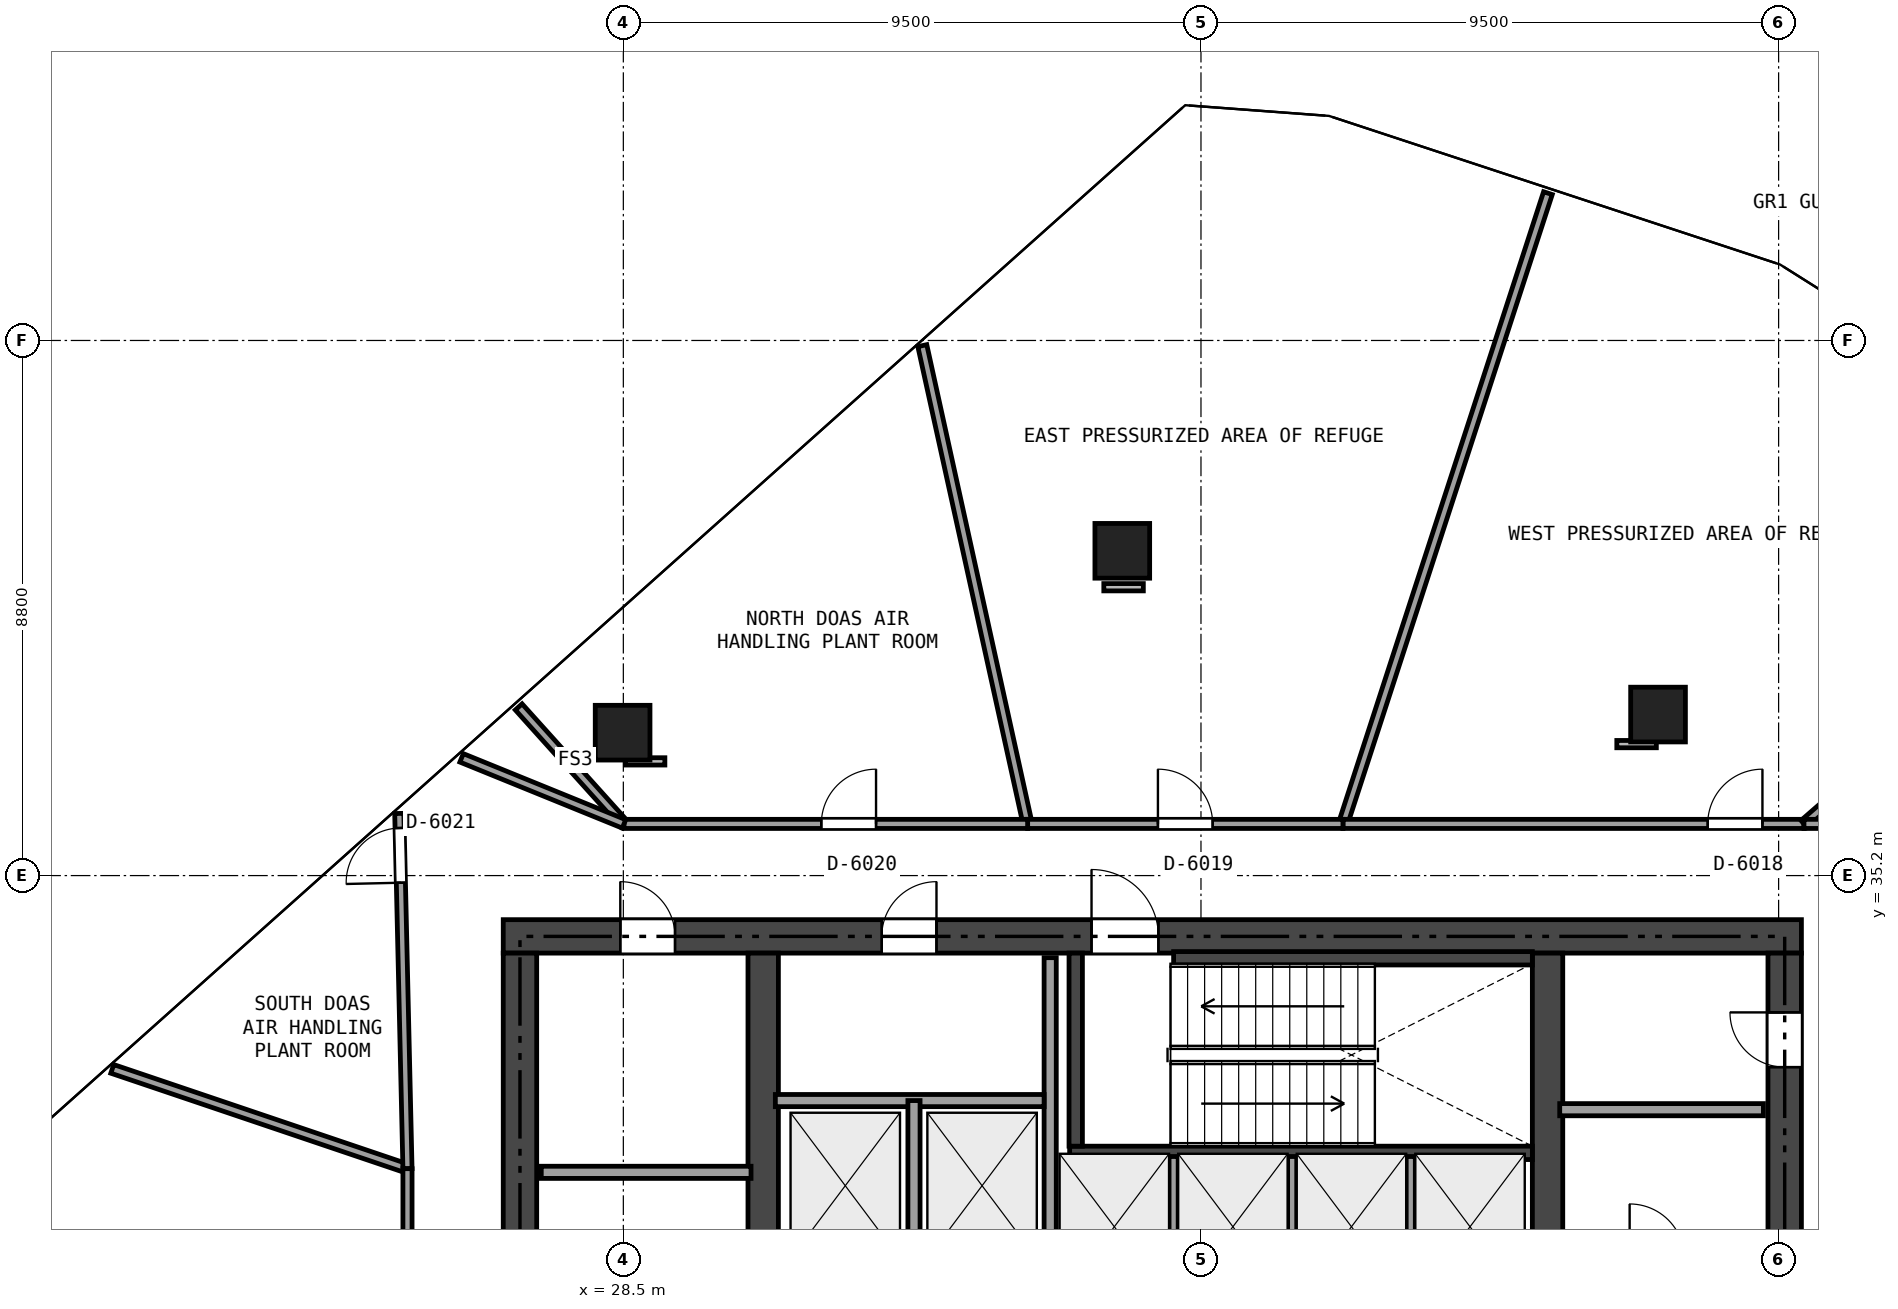
"""IFC4 building model, lengths in metres.
Left out: names, types, materials, properties, quantities, classifications, styles, units other than length and angle.
Written with IfcOpenShell. Run it as: python <this file> out.ifc"""

import sys

from ifc_helpers import new_model, si_unit, direction, frame, frame_2d, origin, origin_2d, place, context, subcontext, project, spatial, rectangle, extrude, element, fill, save


model = new_model("IFC4")
c1 = context("Model", 3, precision=1e-05, world=origin(), true_north=direction((0.0, 1.0)))
c2 = subcontext(c1, "Body", "Model", "MODEL_VIEW")
j1 = project(units=[si_unit("LENGTHUNIT", "METRE"), si_unit("PLANEANGLEUNIT", "RADIAN")], contexts=[c1])
p1 = place(None, origin())
s1 = spatial("IfcSite", under=j1, at=p1, CompositionType="ELEMENT")
p2 = place(p1, origin())
s2 = spatial("IfcBuilding", under=s1, at=p2, CompositionType="ELEMENT")
p3 = place(p2, frame((0.0, 0.0, 223.8)))
s3 = spatial("IfcBuildingStorey", under=s2, at=p3, CompositionType="ELEMENT", Elevation=223.8)
p4 = place(p3, frame((26.525, 34.2, 0.0), z_axis=(0.0, 0.0, 1.0), x_axis=(1.0, 0.0, 0.0)))
e1 = element("IfcWall", 1, at=p4, inside=s3, PredefinedType="SHEAR", context=c2, shape_type="SweptSolid", body=[
    extrude(rectangle(XDim=21.35, YDim=0.55, at=frame_2d((10.675, 0.0))), origin(), (0.0, 0.0, 1.0), 4.14),
])
p5 = place(p4, frame((9.675, 0.0, 0.0)))
e2 = element("IfcOpeningElement", 2, at=p5, cuts=e1, PredefinedType="OPENING", context=c2, shape_type="SweptSolid", body=[
    extrude(rectangle(XDim=1.1, YDim=2.15, at=frame_2d((0.55, 1.075))), frame((0.0, 0.285, 0.0), z_axis=(0.0, -1.0, 0.0), x_axis=(1.0, 0.0, 0.0)), (0.0, 0.0, 1.0), 0.57),
])
p6 = place(p4, frame((1.925, 0.0, 0.0)))
e3 = element("IfcOpeningElement", 3, at=p6, cuts=e1, PredefinedType="OPENING", context=c2, shape_type="SweptSolid", body=[
    extrude(rectangle(XDim=0.9, YDim=2.1, at=frame_2d((0.45, 1.05))), frame((0.0, 0.285, 0.0), z_axis=(0.0, -1.0, 0.0), x_axis=(1.0, 0.0, 0.0)), (0.0, 0.0, 1.0), 0.57),
])
p7 = place(p4, frame((6.225, 0.0, 0.0)))
e4 = element("IfcOpeningElement", 4, at=p7, cuts=e1, PredefinedType="OPENING", context=c2, shape_type="SweptSolid", body=[
    extrude(rectangle(XDim=0.9, YDim=2.1, at=frame_2d((0.45, 1.05))), frame((0.0, 0.285, 0.0), z_axis=(0.0, -1.0, 0.0), x_axis=(1.0, 0.0, 0.0)), (0.0, 0.0, 1.0), 0.57),
])
p8 = place(p3, frame((26.8, 18.875, 0.0), z_axis=(0.0, 0.0, 1.0), x_axis=(0.0, 1.0, 0.0)))
e5 = element("IfcWall", 5, at=p8, inside=s3, PredefinedType="SHEAR", context=c2, shape_type="SweptSolid", body=[
    extrude(rectangle(XDim=15.05, YDim=0.55, at=frame_2d((7.525, 0.0))), origin(), (0.0, 0.0, 1.0), 4.14),
])
p9 = place(p8, frame((4.6, 0.0, 0.02)))
e6 = element("IfcOpeningElement", 6, at=p9, cuts=e5, PredefinedType="OPENING", context=c2, shape_type="SweptSolid", body=[
    extrude(rectangle(XDim=0.9, YDim=2.02, at=frame_2d((0.45, 1.01))), frame((0.0, 0.285, 0.0), z_axis=(0.0, -1.0, 0.0), x_axis=(1.0, 0.0, 0.0)), (0.0, 0.0, 1.0), 0.57),
])
p10 = place(p3, frame((47.6, 18.875, 0.0), z_axis=(0.0, 0.0, 1.0), x_axis=(0.0, 1.0, 0.0)))
e7 = element("IfcWall", 7, at=p10, inside=s3, PredefinedType="SHEAR", context=c2, shape_type="SweptSolid", body=[
    extrude(rectangle(XDim=15.05, YDim=0.55, at=frame_2d((7.525, 0.0))), origin(), (0.0, 0.0, 1.0), 4.14),
])
p11 = place(p10, frame((6.625, 0.0, 0.0)))
e8 = element("IfcOpeningElement", 8, at=p11, cuts=e7, PredefinedType="OPENING", context=c2, shape_type="SweptSolid", body=[
    extrude(rectangle(XDim=1.1, YDim=2.15, at=frame_2d((0.55, 1.075))), frame((0.0, 0.285, 0.0), z_axis=(0.0, -1.0, 0.0), x_axis=(1.0, 0.0, 0.0)), (0.0, 0.0, 1.0), 0.57),
])
p12 = place(p10, frame((8.525, 0.0, 0.0)))
e9 = element("IfcOpeningElement", 9, at=p12, cuts=e7, PredefinedType="OPENING", context=c2, shape_type="SweptSolid", body=[
    extrude(rectangle(XDim=0.9, YDim=2.1, at=frame_2d((0.45, 1.05))), frame((0.0, 0.285, 0.0), z_axis=(0.0, -1.0, 0.0), x_axis=(1.0, 0.0, 0.0)), (0.0, 0.0, 1.0), 0.57),
])
p13 = place(p10, frame((13.175, 0.0, 0.0)))
e10 = element("IfcOpeningElement", 10, at=p13, cuts=e7, PredefinedType="OPENING", context=c2, shape_type="SweptSolid", body=[
    extrude(rectangle(XDim=0.9, YDim=2.1, at=frame_2d((0.45, 1.05))), frame((0.0, 0.285, 0.0), z_axis=(0.0, -1.0, 0.0), x_axis=(1.0, 0.0, 0.0)), (0.0, 0.0, 1.0), 0.57),
])
p14 = place(p3, frame((30.8, 18.875, 0.0), z_axis=(0.0, 0.0, 1.0), x_axis=(0.0, 1.0, 0.0)))
e11 = element("IfcWall", 11, at=p14, inside=s3, PredefinedType="SHEAR", context=c2, shape_type="SweptSolid", body=[
    extrude(rectangle(XDim=15.05, YDim=0.5, at=frame_2d((7.525, 0.0))), origin(), (0.0, 0.0, 1.0), 4.14),
])
p15 = place(p14, frame((6.625, 0.0, 0.0)))
e12 = element("IfcOpeningElement", 12, at=p15, cuts=e11, PredefinedType="OPENING", context=c2, shape_type="SweptSolid", body=[
    extrude(rectangle(XDim=1.1, YDim=2.15, at=frame_2d((0.55, 1.075))), frame((0.0, 0.26, 0.0), z_axis=(0.0, -1.0, 0.0), x_axis=(1.0, 0.0, 0.0)), (0.0, 0.0, 1.0), 0.52),
])
p16 = place(p14, frame((8.425, 0.0, 0.0)))
e13 = element("IfcOpeningElement", 13, at=p16, cuts=e11, PredefinedType="OPENING", context=c2, shape_type="SweptSolid", body=[
    extrude(rectangle(XDim=0.9, YDim=2.1, at=frame_2d((0.45, 1.05))), frame((0.0, 0.26, 0.0), z_axis=(0.0, -1.0, 0.0), x_axis=(1.0, 0.0, 0.0)), (0.0, 0.0, 1.0), 0.52),
])
p17 = place(p3, frame((43.7, 18.875, 0.0), z_axis=(0.0, 0.0, 1.0), x_axis=(0.0, 1.0, 0.0)))
e14 = element("IfcWall", 14, at=p17, inside=s3, PredefinedType="SHEAR", context=c2, shape_type="SweptSolid", body=[
    extrude(rectangle(XDim=15.05, YDim=0.5, at=frame_2d((7.525, 0.0))), origin(), (0.0, 0.0, 1.0), 4.14),
])
p18 = place(p17, frame((8.125, 0.0, 0.0)))
e15 = element("IfcOpeningElement", 15, at=p18, cuts=e14, PredefinedType="OPENING", context=c2, shape_type="SweptSolid", body=[
    extrude(rectangle(XDim=0.9, YDim=2.1, at=frame_2d((0.45, 1.05))), frame((0.0, 0.26, 0.0), z_axis=(0.0, -1.0, 0.0), x_axis=(1.0, 0.0, 0.0)), (0.0, 0.0, 1.0), 0.52),
])
p19 = place(p3, frame((35.84, 30.64, 0.0), z_axis=(0.0, 0.0, 1.0), x_axis=(1.0, 0.0, 0.0)))
e16 = element("IfcWall", 16, at=p19, inside=s3, PredefinedType="SHEAR", context=c2, shape_type="SweptSolid", body=[
    extrude(rectangle(XDim=7.61, YDim=0.22, at=frame_2d((3.805, 0.0))), origin(), (0.0, 0.0, 1.0), 4.14),
])
p20 = place(p3, frame((35.94, 30.75, 0.0), z_axis=(0.0, 0.0, 1.0), x_axis=(0.0, 1.0, 0.0)))
e17 = element("IfcWall", 17, at=p20, inside=s3, PredefinedType="SHEAR", context=c2, shape_type="SweptSolid", body=[
    extrude(rectangle(XDim=3.175, YDim=0.22, at=frame_2d((1.587, 0.0))), origin(), (0.0, 0.0, 1.0), 4.14),
])
p21 = place(p3, frame((37.55, 33.84, 0.0), z_axis=(0.0, 0.0, 1.0), x_axis=(1.0, 0.0, 0.0)))
e18 = element("IfcWall", 18, at=p21, inside=s3, PredefinedType="SHEAR", context=c2, shape_type="SweptSolid", body=[
    extrude(rectangle(XDim=5.9, YDim=0.22, at=frame_2d((2.95, 0.0))), origin(), (0.0, 0.0, 1.0), 4.14),
])
for number, where, z_axis, x_axis in (
    (19, (45.517, 37.848, 0.0), (0.0, 0.0, 1.0), (1.0, 0.0, 0.0)),
    (20, (36.706, 40.541, 0.0), (0.0, 0.0, 1.0), (1.0, 0.0, 0.0)),
    (21, (28.488, 37.55, 0.0), (0.0, 0.0, 1.0), (1.0, 0.0, 0.0)),
):
    element("IfcColumn", number, at=place(p3, frame(where, z_axis=z_axis, x_axis=x_axis)), inside=s3, PredefinedType="COLUMN", context=c2, shape_type="SweptSolid", body=[
        extrude(rectangle(XDim=0.9, YDim=0.9, at=origin_2d()), origin(), (0.0, 0.0, 1.0), 4.14),
    ])
p22 = place(p3, frame((27.15, 30.32, 0.0), z_axis=(0.0, 0.0, 1.0), x_axis=(1.0, 0.0, 0.0)))
e22 = element("IfcWall", 22, at=p22, inside=s3, PredefinedType="SOLIDWALL", context=c2, shape_type="SweptSolid", body=[
    extrude(rectangle(XDim=3.45, YDim=0.2, at=frame_2d((1.725, 0.0))), origin(), (0.0, 0.0, 1.0), 4.14),
])
p23 = place(p3, frame((43.9, 31.35, 0.0), z_axis=(0.0, 0.0, 1.0), x_axis=(1.0, 0.0, 0.0)))
e23 = element("IfcWall", 23, at=p23, inside=s3, PredefinedType="SOLIDWALL", context=c2, shape_type="SweptSolid", body=[
    extrude(rectangle(XDim=3.35, YDim=0.2, at=frame_2d((1.675, 0.0))), origin(), (0.0, 0.0, 1.0), 4.14),
])
p24 = place(p3, frame((35.52, 18.95, 0.0), z_axis=(0.0, 0.0, 1.0), x_axis=(0.0, 1.0, 0.0)))
e24 = element("IfcWall", 24, at=p24, inside=s3, PredefinedType="SOLIDWALL", context=c2, shape_type="SweptSolid", body=[
    extrude(rectangle(XDim=14.9, YDim=0.2, at=frame_2d((7.45, 0.0))), origin(), (0.0, 0.0, 1.0), 3.661),
])
p25 = place(p24, frame((7.755, 0.0, 0.0)))
e25 = element("IfcOpeningElement", 25, at=p25, cuts=e24, PredefinedType="OPENING", context=c2, shape_type="SweptSolid", body=[
    extrude(rectangle(XDim=0.95, YDim=2.15, at=frame_2d((0.475, 1.075))), frame((0.0, 0.11, 0.0), z_axis=(0.0, -1.0, 0.0), x_axis=(1.0, 0.0, 0.0)), (0.0, 0.0, 1.0), 0.22),
])
p26 = place(p24, frame((0.6, 0.0, 0.0)))
e26 = element("IfcOpeningElement", 26, at=p26, cuts=e24, PredefinedType="OPENING", context=c2, shape_type="SweptSolid", body=[
    extrude(rectangle(XDim=0.9, YDim=2.1, at=frame_2d((0.45, 1.05))), frame((0.0, 0.11, 0.0), z_axis=(0.0, -1.0, 0.0), x_axis=(1.0, 0.0, 0.0)), (0.0, 0.0, 1.0), 0.22),
])
p27 = place(p3, frame((31.0, 31.5, 0.0), z_axis=(0.0, 0.0, 1.0), x_axis=(1.0, 0.0, 0.0)))
e27 = element("IfcWall", 27, at=p27, inside=s3, PredefinedType="SOLIDWALL", context=c2, shape_type="SweptSolid", body=[
    extrude(rectangle(XDim=4.42, YDim=0.2, at=frame_2d((2.21, 0.0))), origin(), (0.0, 0.0, 1.0), 4.14),
])
p28 = place(p3, frame((33.28, 28.68, 0.0), z_axis=(0.0, 0.0, 1.0), x_axis=(0.0, 1.0, 0.0)))
e28 = element("IfcWall", 28, at=p28, inside=s3, PredefinedType="SOLIDWALL", context=c2, shape_type="SweptSolid", body=[
    extrude(rectangle(XDim=2.82, YDim=0.2, at=frame_2d((1.41, 0.0))), origin(), (0.0, 0.0, 1.0), 4.14),
])
for number, where, z_axis, x_axis in (
    (29, (37.55, 28.15, 0.0), (0.0, 0.0, 1.0), (0.0, 1.0, 0.0)),
    (30, (39.5, 28.15, 0.0), (0.0, 0.0, 1.0), (0.0, 1.0, 0.0)),
    (31, (41.45, 28.15, 0.0), (0.0, 0.0, 1.0), (0.0, 1.0, 0.0)),
):
    element("IfcWall", number, at=place(p3, frame(where, z_axis=z_axis, x_axis=x_axis)), inside=s3, PredefinedType="PARTITIONING", context=c2, shape_type="SweptSolid", body=[
        extrude(rectangle(XDim=2.43, YDim=0.15, at=frame_2d((1.215, 0.0))), origin(), (0.0, 0.0, 1.0), 4.14),
    ])
p29 = place(p3, frame((43.706, 46.423, 0.0), z_axis=(0.0, 0.0, 1.0), x_axis=(-0.309073925146, -0.951038016483, 0.0)))
e32 = element("IfcWall", 32, at=p29, inside=s3, PredefinedType="PARTITIONING", context=c2, shape_type="SweptSolid", body=[
    extrude(rectangle(XDim=10.907, YDim=0.15, at=frame_2d((5.454, 0.0))), origin(), (0.0, 0.0, 1.0), 3.725),
])
p30 = place(p3, frame((40.335, 36.05, 0.0), z_axis=(0.0, 0.0, 1.0), x_axis=(1.0, 0.0, 0.0)))
e33 = element("IfcWall", 33, at=p30, inside=s3, PredefinedType="PARTITIONING", context=c2, shape_type="SweptSolid", body=[
    extrude(rectangle(XDim=7.582, YDim=0.15, at=frame_2d((3.791, 0.0))), origin(), (0.0, 0.0, 1.0), 3.125),
])
p31 = place(p30, frame((5.999, 0.0, 0.0)))
e34 = element("IfcOpeningElement", 34, at=p31, cuts=e33, PredefinedType="OPENING", context=c2, shape_type="SweptSolid", body=[
    extrude(rectangle(XDim=0.9, YDim=2.0, at=frame_2d((0.45, 1.0))), frame((0.0, 0.085, 0.0), z_axis=(0.0, -1.0, 0.0), x_axis=(1.0, 0.0, 0.0)), (0.0, 0.0, 1.0), 0.17),
])
p32 = place(p3, frame((47.917, 36.05, 0.0), z_axis=(0.0, 0.0, 1.0), x_axis=(0.754262235438, 0.656573286231, 0.0)))
e35 = element("IfcWall", 35, at=p32, inside=s3, PredefinedType="PARTITIONING", context=c2, shape_type="SweptSolid", body=[
    extrude(rectangle(XDim=3.584, YDim=0.15, at=frame_2d((1.792, 0.0))), origin(), (0.0, 0.0, 1.0), 4.14),
])
p33 = place(p3, frame((33.417, 43.915, 0.0), z_axis=(0.0, 0.0, 1.0), x_axis=(0.215055513046, -0.976601825878, 0.0)))
e36 = element("IfcWall", 36, at=p33, inside=s3, PredefinedType="PARTITIONING", context=c2, shape_type="SweptSolid", body=[
    extrude(rectangle(XDim=8.053, YDim=0.15, at=frame_2d((4.027, 0.0))), origin(), (0.0, 0.0, 1.0), 3.725),
])
p34 = place(p3, frame((35.149, 36.05, 0.0), z_axis=(0.0, 0.0, 1.0), x_axis=(1.0, 0.0, 0.0)))
e37 = element("IfcWall", 37, at=p34, inside=s3, PredefinedType="PARTITIONING", context=c2, shape_type="SweptSolid", body=[
    extrude(rectangle(XDim=5.186, YDim=0.15, at=frame_2d((2.593, 0.0))), origin(), (0.0, 0.0, 1.0), 3.125),
])
p35 = place(p34, frame((2.143, 0.0, 0.0)))
e38 = element("IfcOpeningElement", 38, at=p35, cuts=e37, PredefinedType="OPENING", context=c2, shape_type="SweptSolid", body=[
    extrude(rectangle(XDim=0.9, YDim=2.0, at=frame_2d((0.45, 1.0))), frame((0.0, 0.085, 0.0), z_axis=(0.0, -1.0, 0.0), x_axis=(1.0, 0.0, 0.0)), (0.0, 0.0, 1.0), 0.17),
])
p36 = place(p3, frame((26.779, 37.974, 0.0), z_axis=(0.0, 0.0, 1.0), x_axis=(0.669022043981, -0.743242561125, 0.0)))
e39 = element("IfcWall", 39, at=p36, inside=s3, PredefinedType="PARTITIONING", context=c2, shape_type="SweptSolid", body=[
    extrude(rectangle(XDim=2.589, YDim=0.15, at=frame_2d((1.294, 0.0))), origin(), (0.0, 0.0, 1.0), 3.725),
])
p37 = place(p3, frame((28.511, 36.05, 0.0), z_axis=(0.0, 0.0, 1.0), x_axis=(1.0, 0.0, 0.0)))
e40 = element("IfcWall", 40, at=p37, inside=s3, PredefinedType="PARTITIONING", context=c2, shape_type="SweptSolid", body=[
    extrude(rectangle(XDim=6.638, YDim=0.15, at=frame_2d((3.319, 0.0))), origin(), (0.0, 0.0, 1.0), 3.125),
])
p38 = place(p37, frame((3.245, 0.0, 0.0)))
e41 = element("IfcOpeningElement", 41, at=p38, cuts=e40, PredefinedType="OPENING", context=c2, shape_type="SweptSolid", body=[
    extrude(rectangle(XDim=0.9, YDim=2.0, at=frame_2d((0.45, 1.0))), frame((0.0, 0.085, 0.0), z_axis=(0.0, -1.0, 0.0), x_axis=(1.0, 0.0, 0.0)), (0.0, 0.0, 1.0), 0.17),
])
p39 = place(p3, frame((20.095, 32.021, 0.0), z_axis=(0.0, 0.0, 1.0), x_axis=(0.947340977862, -0.320226594247, 0.0)))
e42 = element("IfcWall", 42, at=p39, inside=s3, PredefinedType="PARTITIONING", context=c2, shape_type="SweptSolid", body=[
    extrude(rectangle(XDim=5.125, YDim=0.15, at=frame_2d((2.562, 0.0))), origin(), (0.0, 0.0, 1.0), 3.725),
])
p40 = place(p3, frame((24.95, 30.38, 0.0), z_axis=(0.0, 0.0, 1.0), x_axis=(-0.023103865091, 0.999733070083, 0.0)))
e43 = element("IfcWall", 43, at=p40, inside=s3, PredefinedType="PARTITIONING", context=c2, shape_type="SweptSolid", body=[
    extrude(rectangle(XDim=5.844, YDim=0.15, at=frame_2d((2.922, 0.0))), origin(), (0.0, 0.0, 1.0), 3.725),
])
p41 = place(p40, frame((4.704, 0.0, 0.0)))
e44 = element("IfcOpeningElement", 44, at=p41, cuts=e43, PredefinedType="OPENING", context=c2, shape_type="SweptSolid", body=[
    extrude(rectangle(XDim=0.9, YDim=2.0, at=frame_2d((0.45, 1.0))), frame((0.0, 0.085, 0.0), z_axis=(0.0, -1.0, 0.0), x_axis=(1.0, 0.0, 0.0)), (0.0, 0.0, 1.0), 0.17),
])
p42 = place(p3, frame((25.84, 37.136, 0.0), z_axis=(0.0, 0.0, 1.0), x_axis=(0.926359505319, -0.376640500883, 0.0)))
e45 = element("IfcWall", 45, at=p42, inside=s3, PredefinedType="PARTITIONING", context=c2, shape_type="SweptSolid", body=[
    extrude(rectangle(XDim=2.883, YDim=0.15, at=frame_2d((1.442, 0.0))), origin(), (0.0, 0.0, 1.0), 3.725),
])
p43 = place(p3, frame((24.95, 23.796, 0.0), z_axis=(0.0, 0.0, 1.0), x_axis=(0.0, 1.0, 0.0)))
e46 = element("IfcWall", 46, at=p43, inside=s3, PredefinedType="PARTITIONING", context=c2, shape_type="SweptSolid", body=[
    extrude(rectangle(XDim=6.584, YDim=0.15, at=frame_2d((3.292, 0.0))), origin(), (0.0, 0.0, 1.0), 3.125),
])
p44 = place(p43, frame((1.727, 0.0, 0.0)))
e47 = element("IfcOpeningElement", 47, at=p44, cuts=e46, PredefinedType="OPENING", context=c2, shape_type="SweptSolid", body=[
    extrude(rectangle(XDim=0.9, YDim=2.0, at=frame_2d((0.45, 1.0))), frame((0.0, 0.085, 0.0), z_axis=(0.0, -1.0, 0.0), x_axis=(1.0, 0.0, 0.0)), (0.0, 0.0, 1.0), 0.17),
])
p45 = place(p3, frame((47.917, 36.05, 0.0), z_axis=(0.0, 0.0, 1.0), x_axis=(1.0, 0.0, 0.0)))
e48 = element("IfcWall", 48, at=p45, inside=s3, PredefinedType="PARTITIONING", context=c2, shape_type="SweptSolid", body=[
    extrude(rectangle(XDim=1.533, YDim=0.15, at=frame_2d((0.767, 0.0))), origin(), (0.0, 0.0, 1.0), 4.14),
])
p46 = place(p5, origin())
e49 = element("IfcDoor", 49, at=p46, inside=s3, OperationType="SINGLE_SWING_LEFT", PredefinedType="DOOR", context=c2, shape_type="SweptSolid", body=[
    extrude(rectangle(XDim=1.1, YDim=2.15, at=frame_2d((0.55, 1.075))), frame((0.0, 0.025, 0.0), z_axis=(0.0, -1.0, 0.0), x_axis=(1.0, 0.0, 0.0)), (0.0, 0.0, 1.0), 0.05),
])
fill(e2, e49)
p47 = place(p6, origin())
e50 = element("IfcDoor", 50, at=p47, inside=s3, OperationType="SINGLE_SWING_LEFT", PredefinedType="DOOR", context=c2, shape_type="SweptSolid", body=[
    extrude(rectangle(XDim=0.9, YDim=2.1, at=frame_2d((0.45, 1.05))), frame((0.0, 0.025, 0.0), z_axis=(0.0, -1.0, 0.0), x_axis=(1.0, 0.0, 0.0)), (0.0, 0.0, 1.0), 0.05),
])
fill(e3, e50)
p48 = place(p7, origin())
e51 = element("IfcDoor", 51, at=p48, inside=s3, OperationType="SINGLE_SWING_RIGHT", PredefinedType="DOOR", context=c2, shape_type="SweptSolid", body=[
    extrude(rectangle(XDim=0.9, YDim=2.1, at=frame_2d((0.45, 1.05))), frame((0.0, 0.025, 0.0), z_axis=(0.0, -1.0, 0.0), x_axis=(1.0, 0.0, 0.0)), (0.0, 0.0, 1.0), 0.05),
])
fill(e4, e51)
p49 = place(p13, origin())
e52 = element("IfcDoor", 52, at=p49, inside=s3, OperationType="SINGLE_SWING_RIGHT", PredefinedType="DOOR", context=c2, shape_type="SweptSolid", body=[
    extrude(rectangle(XDim=0.9, YDim=2.1, at=frame_2d((0.45, 1.05))), frame((0.0, 0.025, 0.0), z_axis=(0.0, -1.0, 0.0), x_axis=(1.0, 0.0, 0.0)), (0.0, 0.0, 1.0), 0.05),
])
fill(e10, e52)
p50 = place(p31, origin())
e53 = element("IfcDoor", 53, at=p50, inside=s3, OperationType="SINGLE_SWING_RIGHT", PredefinedType="DOOR", context=c2, shape_type="SweptSolid", body=[
    extrude(rectangle(XDim=0.9, YDim=2.0, at=frame_2d((0.45, 1.0))), frame((0.0, 0.025, 0.0), z_axis=(0.0, -1.0, 0.0), x_axis=(1.0, 0.0, 0.0)), (0.0, 0.0, 1.0), 0.05),
])
fill(e34, e53)
p51 = place(p35, origin())
e54 = element("IfcDoor", 54, at=p51, inside=s3, OperationType="SINGLE_SWING_LEFT", PredefinedType="DOOR", context=c2, shape_type="SweptSolid", body=[
    extrude(rectangle(XDim=0.9, YDim=2.0, at=frame_2d((0.45, 1.0))), frame((0.0, 0.025, 0.0), z_axis=(0.0, -1.0, 0.0), x_axis=(1.0, 0.0, 0.0)), (0.0, 0.0, 1.0), 0.05),
])
fill(e38, e54)
p52 = place(p38, origin())
e55 = element("IfcDoor", 55, at=p52, inside=s3, OperationType="SINGLE_SWING_RIGHT", PredefinedType="DOOR", context=c2, shape_type="SweptSolid", body=[
    extrude(rectangle(XDim=0.9, YDim=2.0, at=frame_2d((0.45, 1.0))), frame((0.0, 0.025, 0.0), z_axis=(0.0, -1.0, 0.0), x_axis=(1.0, 0.0, 0.0)), (0.0, 0.0, 1.0), 0.05),
])
fill(e41, e55)
p53 = place(p41, origin())
e56 = element("IfcDoor", 56, at=p53, inside=s3, OperationType="SINGLE_SWING_LEFT", PredefinedType="DOOR", context=c2, shape_type="SweptSolid", body=[
    extrude(rectangle(XDim=0.9, YDim=2.0, at=frame_2d((0.45, 1.0))), frame((0.0, 0.025, 0.0), z_axis=(0.0, -1.0, 0.0), x_axis=(1.0, 0.0, 0.0)), (0.0, 0.0, 1.0), 0.05),
])
fill(e44, e56)
save(model, sys.argv[1])
